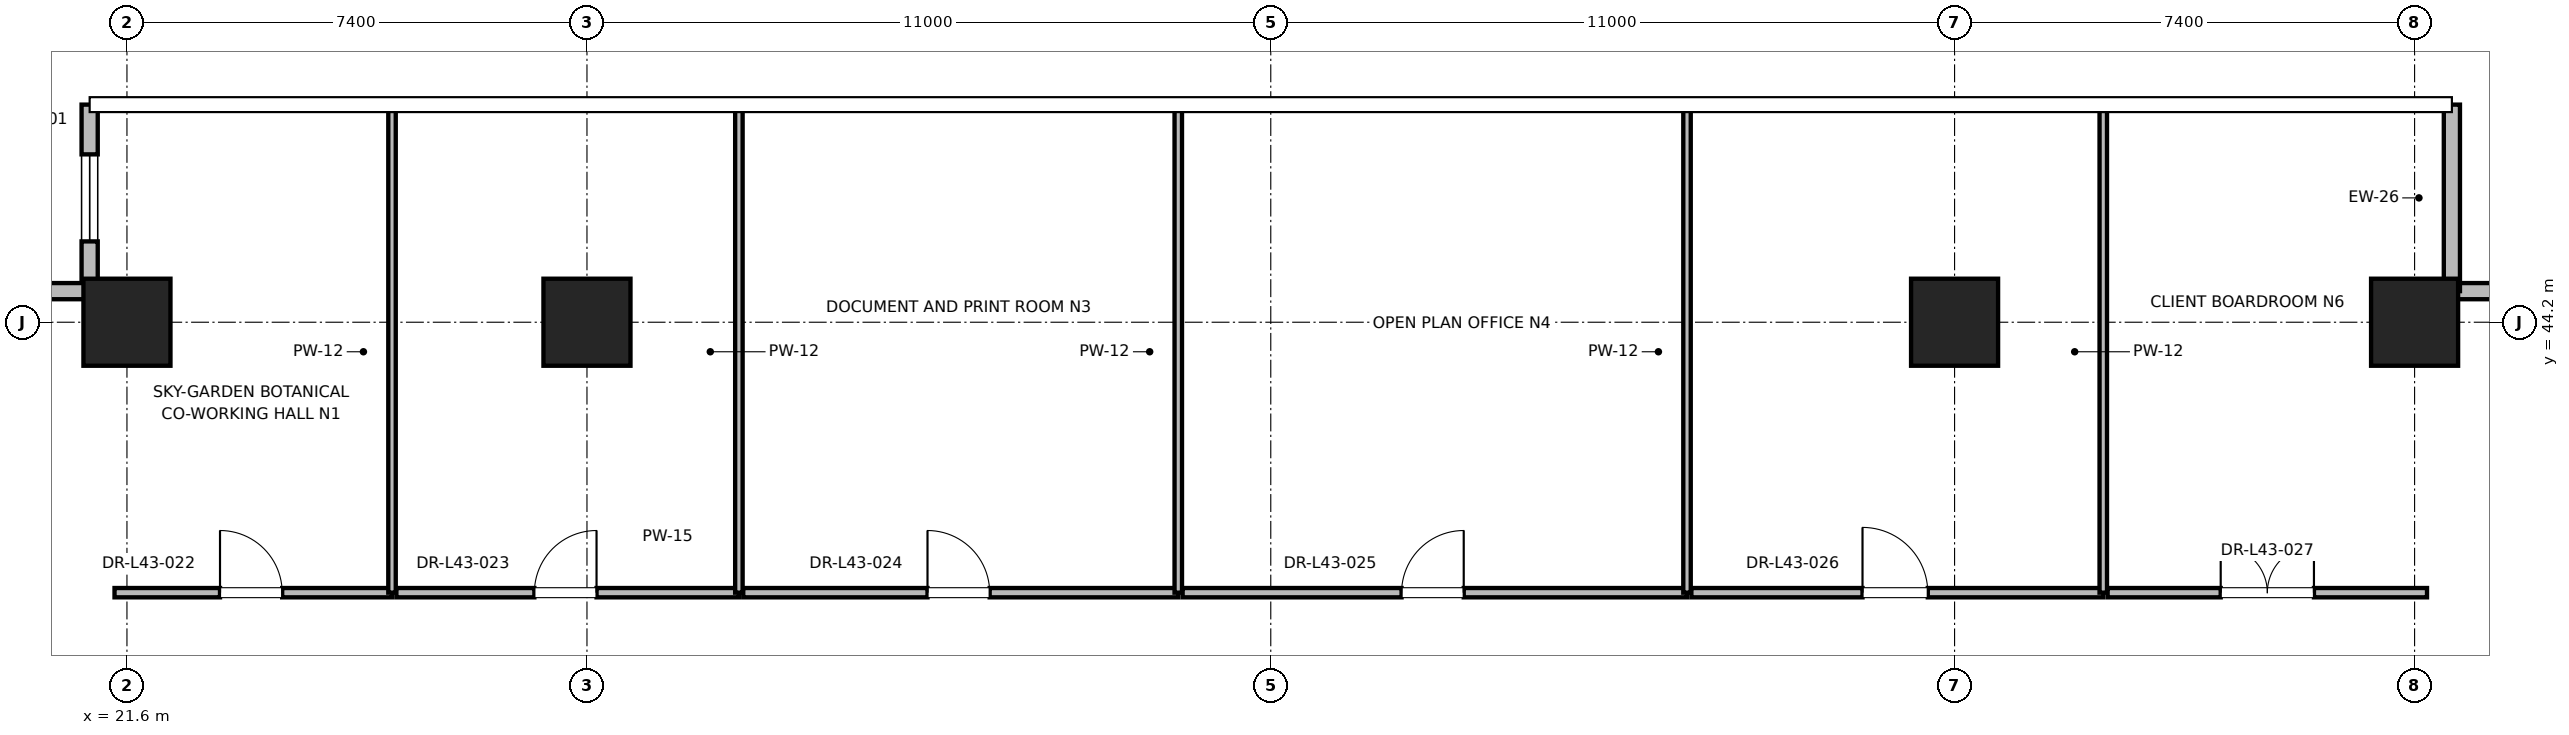
"""IFC4 building model, lengths in metres.
Left out: names, types, materials, properties, quantities, classifications, styles, units other than length and angle.
Written with IfcOpenShell. Run it as: python <this file> out.ifc"""

import sys

from ifc_helpers import new_model, si_unit, direction, frame, frame_2d, origin, origin_2d, place, context, subcontext, project, spatial, rectangle, extrude, element, fill, save


model = new_model("IFC4")
c1 = context("Model", 3, precision=1e-05, world=origin(), true_north=direction((0.0, 1.0)))
c2 = subcontext(c1, "Body", "Model", "MODEL_VIEW")
j1 = project(units=[si_unit("LENGTHUNIT", "METRE"), si_unit("PLANEANGLEUNIT", "RADIAN")], contexts=[c1])
p1 = place(None, origin())
s1 = spatial("IfcSite", under=j1, at=p1, CompositionType="ELEMENT")
p2 = place(p1, origin())
s2 = spatial("IfcBuilding", under=s1, at=p2, CompositionType="ELEMENT")
p3 = place(p2, frame((0.0, 0.0, 184.4)))
s3 = spatial("IfcBuildingStorey", under=s2, at=p3, CompositionType="ELEMENT", Elevation=184.4)
for number, where, z_axis, x_axis in (
    (1, (29.0, 44.2, 0.0), (0.0, 0.0, 1.0), (1.0, 0.0, 0.0)),
    (2, (51.0, 44.2, 0.0), (0.0, 0.0, 1.0), (1.0, 0.0, 0.0)),
    (3, (21.6, 44.2, 0.0), (0.0, 0.0, 1.0), (1.0, 0.0, 0.0)),
    (4, (58.4, 44.2, 0.0), (0.0, 0.0, 1.0), (1.0, 0.0, 0.0)),
):
    element("IfcColumn", number, at=place(p3, frame(where, z_axis=z_axis, x_axis=x_axis)), inside=s3, PredefinedType="COLUMN", context=c2, shape_type="SweptSolid", body=[
        extrude(rectangle(XDim=1.4, YDim=1.4, at=origin_2d()), origin(), (0.0, 0.0, 1.0), 5.0),
    ])
p4 = place(p3, frame((62.4, 44.7, 0.0), z_axis=(0.0, 0.0, 1.0), x_axis=(-1.0, 0.0, 0.0)))
e5 = element("IfcWall", 5, at=p4, inside=s3, PredefinedType="PARAPET", context=c2, shape_type="SweptSolid", body=[
    extrude(rectangle(XDim=3.4, YDim=0.26, at=frame_2d((1.7, 0.0))), origin(), (0.0, 0.0, 1.0), 4.7),
])
p5 = place(p4, frame((1.0, 0.0, 0.85)))
e6 = element("IfcOpeningElement", 6, at=p5, cuts=e5, PredefinedType="OPENING", context=c2, shape_type="SweptSolid", body=[
    extrude(rectangle(XDim=1.4, YDim=2.0, at=frame_2d((0.7, 1.0))), frame((0.0, 0.13, 0.0), z_axis=(0.0, -1.0, 0.0), x_axis=(1.0, 0.0, 0.0)), (0.0, 0.0, 1.0), 0.26),
])
p6 = place(p3, frame((59.0, 44.7, 0.0), z_axis=(0.0, 0.0, 1.0), x_axis=(0.0, 1.0, 0.0)))
e7 = element("IfcWall", 7, at=p6, inside=s3, PredefinedType="PARAPET", context=c2, shape_type="SweptSolid", body=[
    extrude(rectangle(XDim=3.0, YDim=0.26, at=frame_2d((1.5, 0.0))), origin(), (0.0, 0.0, 1.0), 4.7),
])
p7 = place(p3, frame((21.0, 47.7, 0.0), z_axis=(0.0, 0.0, 1.0), x_axis=(0.0, -1.0, 0.0)))
e8 = element("IfcWall", 8, at=p7, inside=s3, PredefinedType="PARAPET", context=c2, shape_type="SweptSolid", body=[
    extrude(rectangle(XDim=3.0, YDim=0.26, at=frame_2d((1.5, 0.0))), origin(), (0.0, 0.0, 1.0), 4.7),
])
p8 = place(p7, frame((0.8, 0.0, 0.85)))
e9 = element("IfcOpeningElement", 9, at=p8, cuts=e8, PredefinedType="OPENING", context=c2, shape_type="SweptSolid", body=[
    extrude(rectangle(XDim=1.4, YDim=2.0, at=frame_2d((0.7, 1.0))), frame((0.0, 0.13, 0.0), z_axis=(0.0, -1.0, 0.0), x_axis=(1.0, 0.0, 0.0)), (0.0, 0.0, 1.0), 0.26),
])
p9 = place(p3, frame((21.0, 44.7, 0.0), z_axis=(0.0, 0.0, 1.0), x_axis=(-1.0, 0.0, 0.0)))
e10 = element("IfcWall", 10, at=p9, inside=s3, PredefinedType="PARAPET", context=c2, shape_type="SweptSolid", body=[
    extrude(rectangle(XDim=3.4, YDim=0.26, at=frame_2d((1.7, 0.0))), origin(), (0.0, 0.0, 1.0), 4.7),
])
p10 = place(p3, frame((21.4, 39.85, 0.0), z_axis=(0.0, 0.0, 1.0), x_axis=(1.0, 0.0, 0.0)))
e11 = element("IfcWall", 11, at=p10, inside=s3, PredefinedType="PARTITIONING", context=c2, shape_type="SweptSolid", body=[
    extrude(rectangle(XDim=4.464, YDim=0.15, at=frame_2d((2.232, 0.0))), origin(), (0.0, 0.0, 1.0), 2.85),
])
p11 = place(p10, frame((1.697, 0.0, 0.0)))
e12 = element("IfcOpeningElement", 12, at=p11, cuts=e11, PredefinedType="OPENING", context=c2, shape_type="SweptSolid", body=[
    extrude(rectangle(XDim=1.0, YDim=2.15, at=frame_2d((0.5, 1.075))), frame((0.0, 0.075, 0.0), z_axis=(0.0, -1.0, 0.0), x_axis=(1.0, 0.0, 0.0)), (0.0, 0.0, 1.0), 0.15),
])
p12 = place(p3, frame((25.864, 39.85, 0.0), z_axis=(0.0, 0.0, 1.0), x_axis=(0.0, 1.0, 0.0)))
e13 = element("IfcWall", 13, at=p12, inside=s3, PredefinedType="PARTITIONING", context=c2, shape_type="SweptSolid", body=[
    extrude(rectangle(XDim=7.75, YDim=0.12, at=frame_2d((3.875, 0.0))), origin(), (0.0, 0.0, 1.0), 2.85),
])
p13 = place(p3, frame((25.934, 39.85, 0.0), z_axis=(0.0, 0.0, 1.0), x_axis=(1.0, 0.0, 0.0)))
e14 = element("IfcWall", 14, at=p13, inside=s3, PredefinedType="PARTITIONING", context=c2, shape_type="SweptSolid", body=[
    extrude(rectangle(XDim=5.51, YDim=0.15, at=frame_2d((2.755, 0.0))), origin(), (0.0, 0.0, 1.0), 2.85),
])
p14 = place(p13, frame((2.22, 0.0, 0.0)))
e15 = element("IfcOpeningElement", 15, at=p14, cuts=e14, PredefinedType="OPENING", context=c2, shape_type="SweptSolid", body=[
    extrude(rectangle(XDim=1.0, YDim=2.15, at=frame_2d((0.5, 1.075))), frame((0.0, 0.075, 0.0), z_axis=(0.0, -1.0, 0.0), x_axis=(1.0, 0.0, 0.0)), (0.0, 0.0, 1.0), 0.15),
])
p15 = place(p3, frame((31.444, 39.85, 0.0), z_axis=(0.0, 0.0, 1.0), x_axis=(0.0, 1.0, 0.0)))
e16 = element("IfcWall", 16, at=p15, inside=s3, PredefinedType="PARTITIONING", context=c2, shape_type="SweptSolid", body=[
    extrude(rectangle(XDim=7.75, YDim=0.12, at=frame_2d((3.875, 0.0))), origin(), (0.0, 0.0, 1.0), 2.85),
])
p16 = place(p3, frame((31.514, 39.85, 0.0), z_axis=(0.0, 0.0, 1.0), x_axis=(1.0, 0.0, 0.0)))
e17 = element("IfcWall", 17, at=p16, inside=s3, PredefinedType="PARTITIONING", context=c2, shape_type="SweptSolid", body=[
    extrude(rectangle(XDim=6.998, YDim=0.15, at=frame_2d((3.499, 0.0))), origin(), (0.0, 0.0, 1.0), 2.85),
])
p17 = place(p16, frame((2.964, 0.0, 0.0)))
e18 = element("IfcOpeningElement", 18, at=p17, cuts=e17, PredefinedType="OPENING", context=c2, shape_type="SweptSolid", body=[
    extrude(rectangle(XDim=1.0, YDim=2.15, at=frame_2d((0.5, 1.075))), frame((0.0, 0.075, 0.0), z_axis=(0.0, -1.0, 0.0), x_axis=(1.0, 0.0, 0.0)), (0.0, 0.0, 1.0), 0.15),
])
p18 = place(p3, frame((38.512, 39.85, 0.0), z_axis=(0.0, 0.0, 1.0), x_axis=(0.0, 1.0, 0.0)))
e19 = element("IfcWall", 19, at=p18, inside=s3, PredefinedType="PARTITIONING", context=c2, shape_type="SweptSolid", body=[
    extrude(rectangle(XDim=7.75, YDim=0.12, at=frame_2d((3.875, 0.0))), origin(), (0.0, 0.0, 1.0), 2.85),
])
p19 = place(p3, frame((38.582, 39.85, 0.0), z_axis=(0.0, 0.0, 1.0), x_axis=(1.0, 0.0, 0.0)))
e20 = element("IfcWall", 20, at=p19, inside=s3, PredefinedType="PARTITIONING", context=c2, shape_type="SweptSolid", body=[
    extrude(rectangle(XDim=8.114, YDim=0.15, at=frame_2d((4.057, 0.0))), origin(), (0.0, 0.0, 1.0), 2.85),
])
p20 = place(p19, frame((3.522, 0.0, 0.0)))
e21 = element("IfcOpeningElement", 21, at=p20, cuts=e20, PredefinedType="OPENING", context=c2, shape_type="SweptSolid", body=[
    extrude(rectangle(XDim=1.0, YDim=2.15, at=frame_2d((0.5, 1.075))), frame((0.0, 0.075, 0.0), z_axis=(0.0, -1.0, 0.0), x_axis=(1.0, 0.0, 0.0)), (0.0, 0.0, 1.0), 0.15),
])
p21 = place(p3, frame((46.696, 39.85, 0.0), z_axis=(0.0, 0.0, 1.0), x_axis=(0.0, 1.0, 0.0)))
e22 = element("IfcWall", 22, at=p21, inside=s3, PredefinedType="PARTITIONING", context=c2, shape_type="SweptSolid", body=[
    extrude(rectangle(XDim=7.75, YDim=0.12, at=frame_2d((3.875, 0.0))), origin(), (0.0, 0.0, 1.0), 2.85),
])
p22 = place(p3, frame((46.766, 39.85, 0.0), z_axis=(0.0, 0.0, 1.0), x_axis=(1.0, 0.0, 0.0)))
e23 = element("IfcWall", 23, at=p22, inside=s3, PredefinedType="PARTITIONING", context=c2, shape_type="SweptSolid", body=[
    extrude(rectangle(XDim=6.626, YDim=0.15, at=frame_2d((3.313, 0.0))), origin(), (0.0, 0.0, 1.0), 2.85),
])
p23 = place(p22, frame((2.753, 0.0, 0.0)))
e24 = element("IfcOpeningElement", 24, at=p23, cuts=e23, PredefinedType="OPENING", context=c2, shape_type="SweptSolid", body=[
    extrude(rectangle(XDim=1.05, YDim=2.2, at=frame_2d((0.525, 1.1))), frame((0.0, 0.075, 0.0), z_axis=(0.0, -1.0, 0.0), x_axis=(1.0, 0.0, 0.0)), (0.0, 0.0, 1.0), 0.15),
])
p24 = place(p3, frame((53.392, 39.85, 0.0), z_axis=(0.0, 0.0, 1.0), x_axis=(0.0, 1.0, 0.0)))
e25 = element("IfcWall", 25, at=p24, inside=s3, PredefinedType="PARTITIONING", context=c2, shape_type="SweptSolid", body=[
    extrude(rectangle(XDim=7.75, YDim=0.12, at=frame_2d((3.875, 0.0))), origin(), (0.0, 0.0, 1.0), 2.85),
])
p25 = place(p3, frame((53.462, 39.85, 0.0), z_axis=(0.0, 0.0, 1.0), x_axis=(1.0, 0.0, 0.0)))
e26 = element("IfcWall", 26, at=p25, inside=s3, PredefinedType="PARTITIONING", context=c2, shape_type="SweptSolid", body=[
    extrude(rectangle(XDim=5.138, YDim=0.15, at=frame_2d((2.569, 0.0))), origin(), (0.0, 0.0, 1.0), 2.85),
])
p26 = place(p25, frame((1.819, 0.0, 0.0)))
e27 = element("IfcOpeningElement", 27, at=p26, cuts=e26, PredefinedType="OPENING", context=c2, shape_type="SweptSolid", body=[
    extrude(rectangle(XDim=1.5, YDim=2.25, at=frame_2d((0.75, 1.125))), frame((0.0, 0.075, 0.0), z_axis=(0.0, -1.0, 0.0), x_axis=(1.0, 0.0, 0.0)), (0.0, 0.0, 1.0), 0.15),
])
p27 = place(p8, origin())
e28 = element("IfcWindow", 28, at=p27, inside=s3, PartitioningType="SINGLE_PANEL", PredefinedType="WINDOW", context=c2, shape_type="SweptSolid", body=[
    extrude(rectangle(XDim=1.4, YDim=2.0, at=frame_2d((0.7, 1.0))), frame((0.0, 0.03, 0.0), z_axis=(0.0, -1.0, 0.0), x_axis=(1.0, 0.0, 0.0)), (0.0, 0.0, 1.0), 0.06),
])
fill(e9, e28)
p28 = place(p11, origin())
e29 = element("IfcDoor", 29, at=p28, inside=s3, OperationType="SINGLE_SWING_LEFT", PredefinedType="DOOR", context=c2, shape_type="SweptSolid", body=[
    extrude(rectangle(XDim=1.0, YDim=2.15, at=frame_2d((0.5, 1.075))), frame((0.0, 0.025, 0.0), z_axis=(0.0, -1.0, 0.0), x_axis=(1.0, 0.0, 0.0)), (0.0, 0.0, 1.0), 0.05),
])
fill(e12, e29)
p29 = place(p14, origin())
e30 = element("IfcDoor", 30, at=p29, inside=s3, OperationType="SINGLE_SWING_RIGHT", PredefinedType="DOOR", context=c2, shape_type="SweptSolid", body=[
    extrude(rectangle(XDim=1.0, YDim=2.15, at=frame_2d((0.5, 1.075))), frame((0.0, 0.025, 0.0), z_axis=(0.0, -1.0, 0.0), x_axis=(1.0, 0.0, 0.0)), (0.0, 0.0, 1.0), 0.05),
])
fill(e15, e30)
p30 = place(p17, origin())
e31 = element("IfcDoor", 31, at=p30, inside=s3, OperationType="SINGLE_SWING_LEFT", PredefinedType="DOOR", context=c2, shape_type="SweptSolid", body=[
    extrude(rectangle(XDim=1.0, YDim=2.15, at=frame_2d((0.5, 1.075))), frame((0.0, 0.025, 0.0), z_axis=(0.0, -1.0, 0.0), x_axis=(1.0, 0.0, 0.0)), (0.0, 0.0, 1.0), 0.05),
])
fill(e18, e31)
p31 = place(p20, origin())
e32 = element("IfcDoor", 32, at=p31, inside=s3, OperationType="SINGLE_SWING_RIGHT", PredefinedType="DOOR", context=c2, shape_type="SweptSolid", body=[
    extrude(rectangle(XDim=1.0, YDim=2.15, at=frame_2d((0.5, 1.075))), frame((0.0, 0.025, 0.0), z_axis=(0.0, -1.0, 0.0), x_axis=(1.0, 0.0, 0.0)), (0.0, 0.0, 1.0), 0.05),
])
fill(e21, e32)
p32 = place(p23, origin())
e33 = element("IfcDoor", 33, at=p32, inside=s3, OperationType="SINGLE_SWING_LEFT", PredefinedType="DOOR", context=c2, shape_type="SweptSolid", body=[
    extrude(rectangle(XDim=1.05, YDim=2.2, at=frame_2d((0.525, 1.1))), frame((0.0, 0.025, 0.0), z_axis=(0.0, -1.0, 0.0), x_axis=(1.0, 0.0, 0.0)), (0.0, 0.0, 1.0), 0.05),
])
fill(e24, e33)
p33 = place(p26, origin())
e34 = element("IfcDoor", 34, at=p33, inside=s3, OperationType="DOUBLE_DOOR_SINGLE_SWING", PredefinedType="DOOR", context=c2, shape_type="SweptSolid", body=[
    extrude(rectangle(XDim=1.5, YDim=2.25, at=frame_2d((0.75, 1.125))), frame((0.0, 0.025, 0.0), z_axis=(0.0, -1.0, 0.0), x_axis=(1.0, 0.0, 0.0)), (0.0, 0.0, 1.0), 0.05),
])
fill(e27, e34)
save(model, sys.argv[1])
